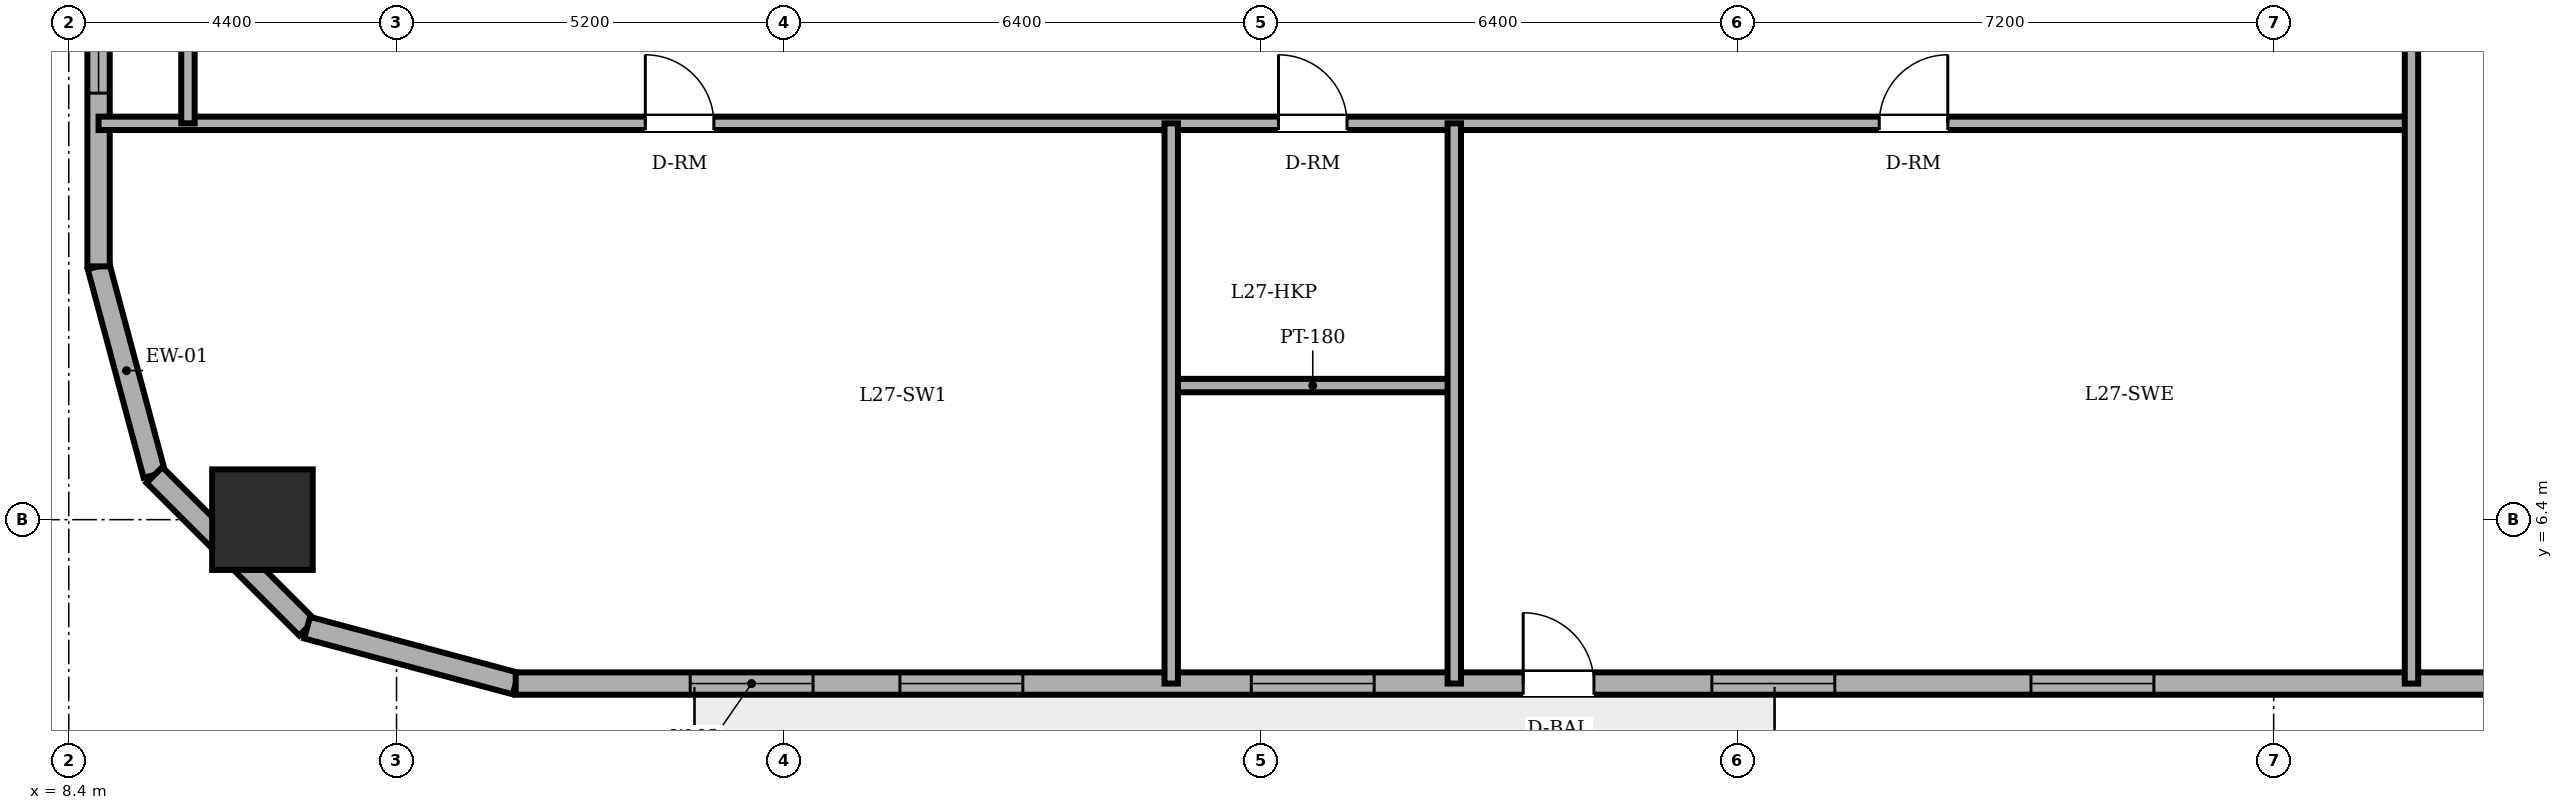
"""IFC4 building model, lengths in metres.
Left out: names, types, materials, properties, quantities, classifications, styles, units other than length and angle.
Written with IfcOpenShell. Run it as: python <this file> out.ifc"""

import sys

from ifc_helpers import new_model, si_unit, direction, frame, frame_2d, origin, origin_2d, place, context, subcontext, project, spatial, rectangle, circle, extrude, element, fill, save


model = new_model("IFC4")
c1 = context("Model", 3, precision=1e-05, world=origin(), true_north=direction((0.0, 1.0)))
c2 = subcontext(c1, "Body", "Model", "MODEL_VIEW")
j1 = project(units=[si_unit("LENGTHUNIT", "METRE"), si_unit("PLANEANGLEUNIT", "RADIAN")], contexts=[c1])
p1 = place(None, origin())
s1 = spatial("IfcSite", under=j1, at=p1, CompositionType="ELEMENT")
p2 = place(p1, origin())
s2 = spatial("IfcBuilding", under=s1, at=p2, CompositionType="ELEMENT")
p3 = place(p2, frame((0.0, 0.0, 104.3)))
s3 = spatial("IfcBuildingStorey", under=s2, at=p3, CompositionType="ELEMENT", Elevation=104.3)
p4 = place(p3, frame((11.0, 6.4, 0.0), z_axis=(0.0, 0.0, 1.0), x_axis=(1.0, 0.0, 0.0)))
e1 = element("IfcColumn", 1, at=p4, inside=s3, PredefinedType="COLUMN", context=c2, shape_type="SweptSolid", body=[
    extrude(circle(Radius=0.675, at=origin_2d()), origin(), (0.0, 0.0, 1.0), 3.6),
])
p5 = place(p3, frame((8.8, 9.8, 0.0), z_axis=(0.0, 0.0, 1.0), x_axis=(0.258731875344, -0.96594917914, 0.0)))
e2 = element("IfcWall", 2, at=p5, inside=s3, PredefinedType="SOLIDWALL", context=c2, shape_type="SweptSolid", body=[
    extrude(rectangle(XDim=2.899, YDim=0.3, at=frame_2d((1.449, 0.0))), origin(), (0.0, 0.0, 1.0), 3.4),
])
p6 = place(p3, frame((9.55, 7.0, 0.0), z_axis=(0.0, 0.0, 1.0), x_axis=(0.707106781187, -0.707106781187, 0.0)))
e3 = element("IfcWall", 3, at=p6, inside=s3, PredefinedType="SOLIDWALL", context=c2, shape_type="SweptSolid", body=[
    extrude(rectangle(XDim=2.899, YDim=0.3, at=frame_2d((1.45, 0.0))), origin(), (0.0, 0.0, 1.0), 3.4),
])
p7 = place(p3, frame((11.6, 4.95, 0.0), z_axis=(0.0, 0.0, 1.0), x_axis=(0.965943540406, -0.258752926066, 0.0)))
e4 = element("IfcWall", 4, at=p7, inside=s3, PredefinedType="SOLIDWALL", context=c2, shape_type="SweptSolid", body=[
    extrude(rectangle(XDim=2.898, YDim=0.3, at=frame_2d((1.449, 0.0))), origin(), (0.0, 0.0, 1.0), 3.4),
])
p8 = place(p3, frame((14.4, 4.2, 0.0), z_axis=(0.0, 0.0, 1.0), x_axis=(1.0, 0.0, 0.0)))
e5 = element("IfcWall", 5, at=p8, inside=s3, PredefinedType="SOLIDWALL", context=c2, shape_type="SweptSolid", body=[
    extrude(rectangle(XDim=29.933, YDim=0.3, at=frame_2d((14.967, 0.0))), origin(), (0.0, 0.0, 1.0), 3.4),
])
p9 = place(p8, frame((13.525, 0.0, 0.0)))
e6 = element("IfcOpeningElement", 6, at=p9, cuts=e5, PredefinedType="OPENING", context=c2, shape_type="SweptSolid", body=[
    extrude(rectangle(XDim=0.95, YDim=2.2, at=frame_2d((0.475, 1.1))), frame((0.0, 0.16, 0.0), z_axis=(0.0, -1.0, 0.0), x_axis=(1.0, 0.0, 0.0)), (0.0, 0.0, 1.0), 0.32),
])
p10 = place(p8, frame((2.342, 0.0, 0.85)))
e7 = element("IfcOpeningElement", 7, at=p10, cuts=e5, PredefinedType="OPENING", context=c2, shape_type="SweptSolid", body=[
    extrude(rectangle(XDim=1.65, YDim=1.55, at=frame_2d((0.825, 0.775))), frame((0.0, 0.16, 0.0), z_axis=(0.0, -1.0, 0.0), x_axis=(1.0, 0.0, 0.0)), (0.0, 0.0, 1.0), 0.32),
])
p11 = place(p8, frame((5.158, 0.0, 0.85)))
e8 = element("IfcOpeningElement", 8, at=p11, cuts=e5, PredefinedType="OPENING", context=c2, shape_type="SweptSolid", body=[
    extrude(rectangle(XDim=1.65, YDim=1.55, at=frame_2d((0.825, 0.775))), frame((0.0, 0.16, 0.0), z_axis=(0.0, -1.0, 0.0), x_axis=(1.0, 0.0, 0.0)), (0.0, 0.0, 1.0), 0.32),
])
p12 = place(p8, frame((9.875, 0.0, 0.85)))
e9 = element("IfcOpeningElement", 9, at=p12, cuts=e5, PredefinedType="OPENING", context=c2, shape_type="SweptSolid", body=[
    extrude(rectangle(XDim=1.65, YDim=1.55, at=frame_2d((0.825, 0.775))), frame((0.0, 0.16, 0.0), z_axis=(0.0, -1.0, 0.0), x_axis=(1.0, 0.0, 0.0)), (0.0, 0.0, 1.0), 0.32),
])
p13 = place(p8, frame((16.058, 0.0, 0.85)))
e10 = element("IfcOpeningElement", 10, at=p13, cuts=e5, PredefinedType="OPENING", context=c2, shape_type="SweptSolid", body=[
    extrude(rectangle(XDim=1.65, YDim=1.55, at=frame_2d((0.825, 0.775))), frame((0.0, 0.16, 0.0), z_axis=(0.0, -1.0, 0.0), x_axis=(1.0, 0.0, 0.0)), (0.0, 0.0, 1.0), 0.32),
])
p14 = place(p8, frame((20.342, 0.0, 0.85)))
e11 = element("IfcOpeningElement", 11, at=p14, cuts=e5, PredefinedType="OPENING", context=c2, shape_type="SweptSolid", body=[
    extrude(rectangle(XDim=1.65, YDim=1.55, at=frame_2d((0.825, 0.775))), frame((0.0, 0.16, 0.0), z_axis=(0.0, -1.0, 0.0), x_axis=(1.0, 0.0, 0.0)), (0.0, 0.0, 1.0), 0.32),
])
p15 = place(p8, frame((26.692, 0.0, 0.85)))
e12 = element("IfcOpeningElement", 12, at=p15, cuts=e5, PredefinedType="OPENING", context=c2, shape_type="SweptSolid", body=[
    extrude(rectangle(XDim=1.65, YDim=1.55, at=frame_2d((0.825, 0.775))), frame((0.0, 0.16, 0.0), z_axis=(0.0, -1.0, 0.0), x_axis=(1.0, 0.0, 0.0)), (0.0, 0.0, 1.0), 0.32),
])
p16 = place(p3, frame((8.8, 38.2, 0.0), z_axis=(0.0, 0.0, 1.0), x_axis=(0.0, -1.0, 0.0)))
e13 = element("IfcWall", 13, at=p16, inside=s3, PredefinedType="SOLIDWALL", context=c2, shape_type="SweptSolid", body=[
    extrude(rectangle(XDim=28.4, YDim=0.3, at=frame_2d((14.2, 0.0))), origin(), (0.0, 0.0, 1.0), 3.4),
])
p17 = place(p16, frame((2.325, 0.0, 0.85)))
e14 = element("IfcOpeningElement", 14, at=p17, cuts=e13, PredefinedType="OPENING", context=c2, shape_type="SweptSolid", body=[
    extrude(rectangle(XDim=1.65, YDim=1.55, at=frame_2d((0.825, 0.775))), frame((0.0, 0.16, 0.0), z_axis=(0.0, -1.0, 0.0), x_axis=(1.0, 0.0, 0.0)), (0.0, 0.0, 1.0), 0.32),
])
p18 = place(p16, frame((7.328, 0.0, 0.85)))
e15 = element("IfcOpeningElement", 15, at=p18, cuts=e13, PredefinedType="OPENING", context=c2, shape_type="SweptSolid", body=[
    extrude(rectangle(XDim=1.65, YDim=1.55, at=frame_2d((0.825, 0.775))), frame((0.0, 0.16, 0.0), z_axis=(0.0, -1.0, 0.0), x_axis=(1.0, 0.0, 0.0)), (0.0, 0.0, 1.0), 0.32),
])
p19 = place(p16, frame((11.102, 0.0, 0.85)))
e16 = element("IfcOpeningElement", 16, at=p19, cuts=e13, PredefinedType="OPENING", context=c2, shape_type="SweptSolid", body=[
    extrude(rectangle(XDim=1.65, YDim=1.55, at=frame_2d((0.825, 0.775))), frame((0.0, 0.16, 0.0), z_axis=(0.0, -1.0, 0.0), x_axis=(1.0, 0.0, 0.0)), (0.0, 0.0, 1.0), 0.32),
])
p20 = place(p16, frame((17.648, 0.0, 0.85)))
e17 = element("IfcOpeningElement", 17, at=p20, cuts=e13, PredefinedType="OPENING", context=c2, shape_type="SweptSolid", body=[
    extrude(rectangle(XDim=1.65, YDim=1.55, at=frame_2d((0.825, 0.775))), frame((0.0, 0.16, 0.0), z_axis=(0.0, -1.0, 0.0), x_axis=(1.0, 0.0, 0.0)), (0.0, 0.0, 1.0), 0.32),
])
p21 = place(p16, frame((20.422, 0.0, 0.85)))
e18 = element("IfcOpeningElement", 18, at=p21, cuts=e13, PredefinedType="OPENING", context=c2, shape_type="SweptSolid", body=[
    extrude(rectangle(XDim=1.65, YDim=1.55, at=frame_2d((0.825, 0.775))), frame((0.0, 0.16, 0.0), z_axis=(0.0, -1.0, 0.0), x_axis=(1.0, 0.0, 0.0)), (0.0, 0.0, 1.0), 0.32),
])
p22 = place(p16, frame((24.425, 0.0, 0.85)))
e19 = element("IfcOpeningElement", 19, at=p22, cuts=e13, PredefinedType="OPENING", context=c2, shape_type="SweptSolid", body=[
    extrude(rectangle(XDim=1.65, YDim=1.55, at=frame_2d((0.825, 0.775))), frame((0.0, 0.16, 0.0), z_axis=(0.0, -1.0, 0.0), x_axis=(1.0, 0.0, 0.0)), (0.0, 0.0, 1.0), 0.32),
])
p23 = place(p3, frame((23.2, 8.2, 0.0), z_axis=(0.0, 0.0, 1.0), x_axis=(1.0, 0.0, 0.0)))
e20 = element("IfcWall", 20, at=p23, inside=s3, PredefinedType="PARTITIONING", context=c2, shape_type="SweptSolid", body=[
    extrude(rectangle(XDim=3.8, YDim=0.18, at=frame_2d((1.9, 0.0))), origin(), (0.0, 0.0, 1.0), 3.4),
])
p24 = place(p3, frame((8.8, 11.72, 0.0), z_axis=(0.0, 0.0, 1.0), x_axis=(1.0, 0.0, 0.0)))
e21 = element("IfcWall", 21, at=p24, inside=s3, PredefinedType="PARTITIONING", context=c2, shape_type="SweptSolid", body=[
    extrude(rectangle(XDim=31.05, YDim=0.18, at=frame_2d((15.525, 0.0))), origin(), (0.0, 0.0, 1.0), 3.4),
])
p25 = place(p24, frame((15.84, 0.0, 0.0)))
e22 = element("IfcOpeningElement", 22, at=p25, cuts=e21, PredefinedType="OPENING", context=c2, shape_type="SweptSolid", body=[
    extrude(rectangle(XDim=0.92, YDim=2.1, at=frame_2d((0.46, 1.05))), frame((0.0, 0.1, 0.0), z_axis=(0.0, -1.0, 0.0), x_axis=(1.0, 0.0, 0.0)), (0.0, 0.0, 1.0), 0.2),
])
p26 = place(p24, frame((7.34, 0.0, 0.0)))
e23 = element("IfcOpeningElement", 23, at=p26, cuts=e21, PredefinedType="OPENING", context=c2, shape_type="SweptSolid", body=[
    extrude(rectangle(XDim=0.92, YDim=2.1, at=frame_2d((0.46, 1.05))), frame((0.0, 0.1, 0.0), z_axis=(0.0, -1.0, 0.0), x_axis=(1.0, 0.0, 0.0)), (0.0, 0.0, 1.0), 0.2),
])
p27 = place(p24, frame((23.905, 0.0, 0.0)))
e24 = element("IfcOpeningElement", 24, at=p27, cuts=e21, PredefinedType="OPENING", context=c2, shape_type="SweptSolid", body=[
    extrude(rectangle(XDim=0.92, YDim=2.1, at=frame_2d((0.46, 1.05))), frame((0.0, 0.1, 0.0), z_axis=(0.0, -1.0, 0.0), x_axis=(1.0, 0.0, 0.0)), (0.0, 0.0, 1.0), 0.2),
])
p28 = place(p3, frame((10.0, 11.72, 0.0), z_axis=(0.0, 0.0, 1.0), x_axis=(0.0, 1.0, 0.0)))
e25 = element("IfcWall", 25, at=p28, inside=s3, PredefinedType="PARTITIONING", context=c2, shape_type="SweptSolid", body=[
    extrude(rectangle(XDim=2.46, YDim=0.18, at=frame_2d((1.23, 0.0))), origin(), (0.0, 0.0, 1.0), 3.4),
])
for number, where, z_axis, x_axis in (
    (26, (23.2, 4.2, 0.0), (0.0, 0.0, 1.0), (0.0, 1.0, 0.0)),
    (27, (27.0, 4.2, 0.0), (0.0, 0.0, 1.0), (0.0, 1.0, 0.0)),
):
    element("IfcWall", number, at=place(p3, frame(where, z_axis=z_axis, x_axis=x_axis)), inside=s3, PredefinedType="PARTITIONING", context=c2, shape_type="SweptSolid", body=[
        extrude(rectangle(XDim=7.52, YDim=0.18, at=frame_2d((3.76, 0.0))), origin(), (0.0, 0.0, 1.0), 3.4),
    ])
p29 = place(p3, frame((39.85, 4.2, 0.0), z_axis=(0.0, 0.0, 1.0), x_axis=(0.0, 1.0, 0.0)))
e28 = element("IfcWall", 28, at=p29, inside=s3, PredefinedType="PARTITIONING", context=c2, shape_type="SweptSolid", body=[
    extrude(rectangle(XDim=18.62, YDim=0.18, at=frame_2d((9.31, 0.0))), origin(), (0.0, 0.0, 1.0), 3.4),
])
p30 = place(p29, frame((12.31, 0.0, 0.0)))
e29 = element("IfcOpeningElement", 29, at=p30, cuts=e28, PredefinedType="OPENING", context=c2, shape_type="SweptSolid", body=[
    extrude(rectangle(XDim=1.0, YDim=2.15, at=frame_2d((0.5, 1.075))), frame((0.0, 0.1, 0.0), z_axis=(0.0, -1.0, 0.0), x_axis=(1.0, 0.0, 0.0)), (0.0, 0.0, 1.0), 0.2),
])
p31 = place(p9, origin())
e30 = element("IfcDoor", 30, at=p31, inside=s3, OperationType="SINGLE_SWING_LEFT", PredefinedType="DOOR", context=c2, shape_type="SweptSolid", body=[
    extrude(rectangle(XDim=0.95, YDim=2.2, at=frame_2d((0.475, 1.1))), frame((0.0, 0.025, 0.0), z_axis=(0.0, -1.0, 0.0), x_axis=(1.0, 0.0, 0.0)), (0.0, 0.0, 1.0), 0.05),
])
fill(e6, e30)
p32 = place(p10, origin())
e31 = element("IfcWindow", 31, at=p32, inside=s3, PartitioningType="DOUBLE_PANEL_VERTICAL", PredefinedType="WINDOW", context=c2, shape_type="SweptSolid", body=[
    extrude(rectangle(XDim=1.65, YDim=1.55, at=frame_2d((0.825, 0.775))), frame((0.0, 0.03, 0.0), z_axis=(0.0, -1.0, 0.0), x_axis=(1.0, 0.0, 0.0)), (0.0, 0.0, 1.0), 0.06),
])
fill(e7, e31)
p33 = place(p11, origin())
e32 = element("IfcWindow", 32, at=p33, inside=s3, PartitioningType="DOUBLE_PANEL_VERTICAL", PredefinedType="WINDOW", context=c2, shape_type="SweptSolid", body=[
    extrude(rectangle(XDim=1.65, YDim=1.55, at=frame_2d((0.825, 0.775))), frame((0.0, 0.03, 0.0), z_axis=(0.0, -1.0, 0.0), x_axis=(1.0, 0.0, 0.0)), (0.0, 0.0, 1.0), 0.06),
])
fill(e8, e32)
p34 = place(p12, origin())
e33 = element("IfcWindow", 33, at=p34, inside=s3, PartitioningType="DOUBLE_PANEL_VERTICAL", PredefinedType="WINDOW", context=c2, shape_type="SweptSolid", body=[
    extrude(rectangle(XDim=1.65, YDim=1.55, at=frame_2d((0.825, 0.775))), frame((0.0, 0.03, 0.0), z_axis=(0.0, -1.0, 0.0), x_axis=(1.0, 0.0, 0.0)), (0.0, 0.0, 1.0), 0.06),
])
fill(e9, e33)
p35 = place(p13, origin())
e34 = element("IfcWindow", 34, at=p35, inside=s3, PartitioningType="DOUBLE_PANEL_VERTICAL", PredefinedType="WINDOW", context=c2, shape_type="SweptSolid", body=[
    extrude(rectangle(XDim=1.65, YDim=1.55, at=frame_2d((0.825, 0.775))), frame((0.0, 0.03, 0.0), z_axis=(0.0, -1.0, 0.0), x_axis=(1.0, 0.0, 0.0)), (0.0, 0.0, 1.0), 0.06),
])
fill(e10, e34)
p36 = place(p14, origin())
e35 = element("IfcWindow", 35, at=p36, inside=s3, PartitioningType="DOUBLE_PANEL_VERTICAL", PredefinedType="WINDOW", context=c2, shape_type="SweptSolid", body=[
    extrude(rectangle(XDim=1.65, YDim=1.55, at=frame_2d((0.825, 0.775))), frame((0.0, 0.03, 0.0), z_axis=(0.0, -1.0, 0.0), x_axis=(1.0, 0.0, 0.0)), (0.0, 0.0, 1.0), 0.06),
])
fill(e11, e35)
p37 = place(p22, origin())
e36 = element("IfcWindow", 36, at=p37, inside=s3, PartitioningType="DOUBLE_PANEL_VERTICAL", PredefinedType="WINDOW", context=c2, shape_type="SweptSolid", body=[
    extrude(rectangle(XDim=1.65, YDim=1.55, at=frame_2d((0.825, 0.775))), frame((0.0, 0.03, 0.0), z_axis=(0.0, -1.0, 0.0), x_axis=(1.0, 0.0, 0.0)), (0.0, 0.0, 1.0), 0.06),
])
fill(e19, e36)
p38 = place(p25, origin())
e37 = element("IfcDoor", 37, at=p38, inside=s3, OperationType="SINGLE_SWING_LEFT", PredefinedType="DOOR", context=c2, shape_type="SweptSolid", body=[
    extrude(rectangle(XDim=0.92, YDim=2.1, at=frame_2d((0.46, 1.05))), frame((0.0, 0.025, 0.0), z_axis=(0.0, -1.0, 0.0), x_axis=(1.0, 0.0, 0.0)), (0.0, 0.0, 1.0), 0.05),
])
fill(e22, e37)
p39 = place(p26, origin())
e38 = element("IfcDoor", 38, at=p39, inside=s3, OperationType="SINGLE_SWING_LEFT", PredefinedType="DOOR", context=c2, shape_type="SweptSolid", body=[
    extrude(rectangle(XDim=0.92, YDim=2.1, at=frame_2d((0.46, 1.05))), frame((0.0, 0.025, 0.0), z_axis=(0.0, -1.0, 0.0), x_axis=(1.0, 0.0, 0.0)), (0.0, 0.0, 1.0), 0.05),
])
fill(e23, e38)
p40 = place(p27, origin())
e39 = element("IfcDoor", 39, at=p40, inside=s3, OperationType="SINGLE_SWING_RIGHT", PredefinedType="DOOR", context=c2, shape_type="SweptSolid", body=[
    extrude(rectangle(XDim=0.92, YDim=2.1, at=frame_2d((0.46, 1.05))), frame((0.0, 0.025, 0.0), z_axis=(0.0, -1.0, 0.0), x_axis=(1.0, 0.0, 0.0)), (0.0, 0.0, 1.0), 0.05),
])
fill(e24, e39)
save(model, sys.argv[1])
